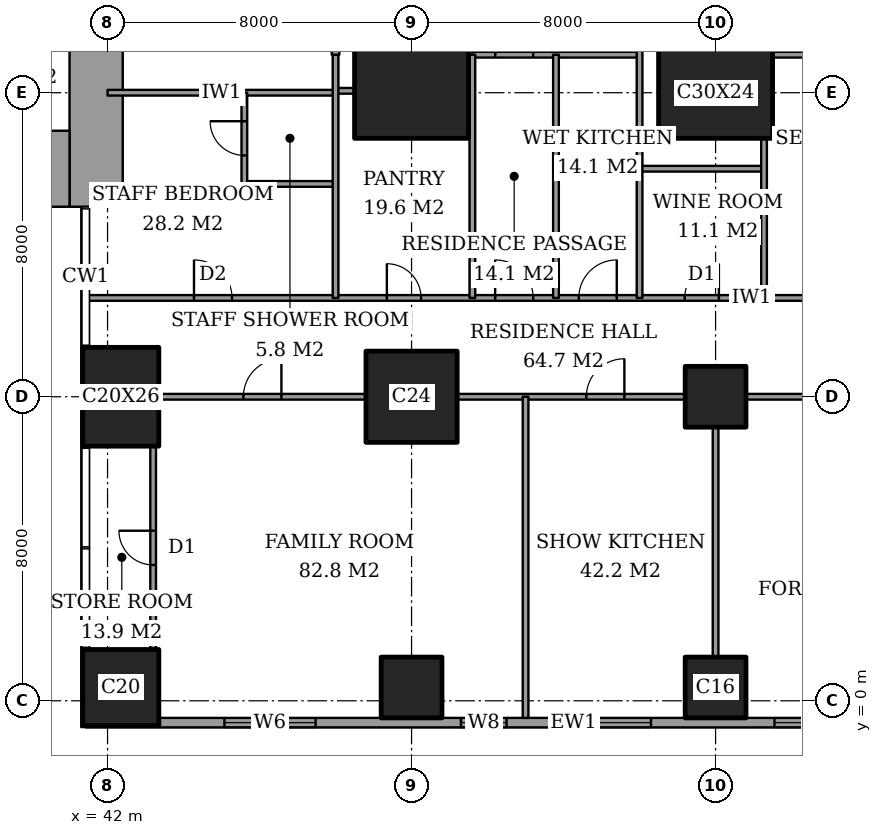
"""IFC4 building model, lengths in metres.
Left out: names, types, materials, properties, quantities, classifications, styles, units other than length and angle.
Written with IfcOpenShell. Run it as: python <this file> out.ifc"""

import sys

from ifc_helpers import new_model, si_unit, direction, frame, frame_2d, origin, origin_2d, place, context, subcontext, project, spatial, rectangle, extrude, element, fill, save


model = new_model("IFC4")
c1 = context("Model", 3, precision=1e-05, world=origin(), true_north=direction((0.0, 1.0)))
c2 = subcontext(c1, "Body", "Model", "MODEL_VIEW")
j1 = project(units=[si_unit("LENGTHUNIT", "METRE"), si_unit("PLANEANGLEUNIT", "RADIAN")], contexts=[c1])
p1 = place(None, origin())
s1 = spatial("IfcSite", under=j1, at=p1, CompositionType="ELEMENT")
p2 = place(p1, origin())
s2 = spatial("IfcBuilding", under=s1, at=p2, CompositionType="ELEMENT")
p3 = place(p2, frame((0.0, 0.0, 273.6)))
s3 = spatial("IfcBuildingStorey", under=s2, at=p3, CompositionType="ELEMENT", Elevation=273.6)
p4 = place(p3, frame((42.35, 0.35, 0.0), z_axis=(0.0, 0.0, 1.0), x_axis=(1.0, 0.0, 0.0)))
e1 = element("IfcColumn", 1, at=p4, inside=s3, PredefinedType="COLUMN", context=c2, shape_type="SweptSolid", body=[
    extrude(rectangle(XDim=2.0, YDim=2.0, at=origin_2d()), origin(), (0.0, 0.0, 1.0), 3.6),
])
p5 = place(p3, frame((42.35, 8.0, 0.0), z_axis=(0.0, 0.0, 1.0), x_axis=(1.0, 0.0, 0.0)))
e2 = element("IfcColumn", 2, at=p5, inside=s3, PredefinedType="COLUMN", context=c2, shape_type="SweptSolid", body=[
    extrude(rectangle(XDim=2.0, YDim=2.6, at=origin_2d()), origin(), (0.0, 0.0, 1.0), 3.6),
])
p6 = place(p3, frame((50.0, 0.35, 0.0), z_axis=(0.0, 0.0, 1.0), x_axis=(1.0, 0.0, 0.0)))
e3 = element("IfcColumn", 3, at=p6, inside=s3, PredefinedType="COLUMN", context=c2, shape_type="SweptSolid", body=[
    extrude(rectangle(XDim=1.6, YDim=1.6, at=origin_2d()), origin(), (0.0, 0.0, 1.0), 3.6),
])
p7 = place(p3, frame((50.0, 8.0, 0.0), z_axis=(0.0, 0.0, 1.0), x_axis=(1.0, 0.0, 0.0)))
e4 = element("IfcColumn", 4, at=p7, inside=s3, PredefinedType="COLUMN", context=c2, shape_type="SweptSolid", body=[
    extrude(rectangle(XDim=2.4, YDim=2.4, at=origin_2d()), origin(), (0.0, 0.0, 1.0), 3.6),
])
p8 = place(p3, frame((50.0, 16.0, 0.0), z_axis=(0.0, 0.0, 1.0), x_axis=(1.0, 0.0, 0.0)))
e5 = element("IfcColumn", 5, at=p8, inside=s3, PredefinedType="COLUMN", context=c2, shape_type="SweptSolid", body=[
    extrude(rectangle(XDim=3.0, YDim=2.4, at=origin_2d()), origin(), (0.0, 0.0, 1.0), 3.6),
])
for number, where, z_axis, x_axis in (
    (6, (58.0, 0.35, 0.0), (0.0, 0.0, 1.0), (1.0, 0.0, 0.0)),
    (7, (58.0, 8.0, 0.0), (0.0, 0.0, 1.0), (1.0, 0.0, 0.0)),
):
    element("IfcColumn", number, at=place(p3, frame(where, z_axis=z_axis, x_axis=x_axis)), inside=s3, PredefinedType="COLUMN", context=c2, shape_type="SweptSolid", body=[
        extrude(rectangle(XDim=1.6, YDim=1.6, at=origin_2d()), origin(), (0.0, 0.0, 1.0), 3.6),
    ])
p9 = place(p3, frame((58.0, 16.0, 0.0), z_axis=(0.0, 0.0, 1.0), x_axis=(1.0, 0.0, 0.0)))
e8 = element("IfcColumn", 8, at=p9, inside=s3, PredefinedType="COLUMN", context=c2, shape_type="SweptSolid", body=[
    extrude(rectangle(XDim=3.0, YDim=2.4, at=origin_2d()), origin(), (0.0, 0.0, 1.0), 3.6),
])
p10 = place(p3, frame((37.85, 14.0, 0.0), z_axis=(0.0, 0.0, 1.0), x_axis=(1.0, 0.0, 0.0)))
e9 = element("IfcWall", 9, at=p10, inside=s3, PredefinedType="SHEAR", context=c2, shape_type="SweptSolid", body=[
    extrude(rectangle(XDim=3.15, YDim=2.0, at=frame_2d((1.575, 0.0))), origin(), (0.0, 0.0, 1.0), 3.6),
])
p11 = place(p3, frame((41.7, 13.0, 0.0), z_axis=(0.0, 0.0, 1.0), x_axis=(0.0, 1.0, 0.0)))
e10 = element("IfcWall", 10, at=p11, inside=s3, PredefinedType="SHEAR", context=c2, shape_type="SweptSolid", body=[
    extrude(rectangle(XDim=11.85, YDim=1.4, at=frame_2d((5.925, 0.0))), origin(), (0.0, 0.0, 1.0), 3.6),
])
p12 = place(p11, frame((7.5, 0.0, 0.0)))
e11 = element("IfcOpeningElement", 11, at=p12, cuts=e10, PredefinedType="OPENING", context=c2, shape_type="SweptSolid", body=[
    extrude(rectangle(XDim=1.8, YDim=2.4, at=frame_2d((0.9, 1.2))), frame((0.0, 0.71, 0.0), z_axis=(0.0, -1.0, 0.0), x_axis=(1.0, 0.0, 0.0)), (0.0, 0.0, 1.0), 1.42),
])
p13 = place(p3, frame((41.425, -0.575, 0.0), z_axis=(0.0, 0.0, 1.0), x_axis=(1.0, 0.0, 0.0)))
e12 = element("IfcWall", 12, at=p13, inside=s3, PredefinedType="SOLIDWALL", context=c2, shape_type="SweptSolid", body=[
    extrude(rectangle(XDim=21.4, YDim=0.25, at=frame_2d((10.7, 0.0))), origin(), (0.0, 0.0, 1.0), 3.6),
])
p14 = place(p13, frame((3.65, 0.0, 0.6)))
e13 = element("IfcOpeningElement", 13, at=p14, cuts=e12, PredefinedType="OPENING", context=c2, shape_type="SweptSolid", body=[
    extrude(rectangle(XDim=2.4, YDim=2.0, at=frame_2d((1.2, 1.0))), frame((0.0, 0.135, 0.0), z_axis=(0.0, -1.0, 0.0), x_axis=(1.0, 0.0, 0.0)), (0.0, 0.0, 1.0), 0.27),
])
p15 = place(p13, frame((9.875, 0.0, 0.6)))
e14 = element("IfcOpeningElement", 14, at=p15, cuts=e12, PredefinedType="OPENING", context=c2, shape_type="SweptSolid", body=[
    extrude(rectangle(XDim=1.2, YDim=2.0, at=frame_2d((0.6, 1.0))), frame((0.0, 0.135, 0.0), z_axis=(0.0, -1.0, 0.0), x_axis=(1.0, 0.0, 0.0)), (0.0, 0.0, 1.0), 0.27),
])
p16 = place(p13, frame((12.475, 0.0, 0.6)))
e15 = element("IfcOpeningElement", 15, at=p16, cuts=e12, PredefinedType="OPENING", context=c2, shape_type="SweptSolid", body=[
    extrude(rectangle(XDim=2.4, YDim=2.0, at=frame_2d((1.2, 1.0))), frame((0.0, 0.135, 0.0), z_axis=(0.0, -1.0, 0.0), x_axis=(1.0, 0.0, 0.0)), (0.0, 0.0, 1.0), 0.27),
])
p17 = place(p13, frame((18.125, 0.0, 0.6)))
e16 = element("IfcOpeningElement", 16, at=p17, cuts=e12, PredefinedType="OPENING", context=c2, shape_type="SweptSolid", body=[
    extrude(rectangle(XDim=2.4, YDim=2.0, at=frame_2d((1.2, 1.0))), frame((0.0, 0.135, 0.0), z_axis=(0.0, -1.0, 0.0), x_axis=(1.0, 0.0, 0.0)), (0.0, 0.0, 1.0), 0.27),
])
p18 = place(p3, frame((43.35, 8.0, 0.0), z_axis=(0.0, 0.0, 1.0), x_axis=(1.0, 0.0, 0.0)))
e17 = element("IfcWall", 17, at=p18, inside=s3, PredefinedType="PARTITIONING", context=c2, shape_type="SweptSolid", body=[
    extrude(rectangle(XDim=5.45, YDim=0.15, at=frame_2d((2.725, 0.0))), origin(), (0.0, 0.0, 1.0), 3.25),
])
p19 = place(p18, frame((2.225, 0.0, 0.0)))
e18 = element("IfcOpeningElement", 18, at=p19, cuts=e17, PredefinedType="OPENING", context=c2, shape_type="SweptSolid", body=[
    extrude(rectangle(XDim=1.0, YDim=2.1, at=frame_2d((0.5, 1.05))), frame((0.0, 0.085, 0.0), z_axis=(0.0, -1.0, 0.0), x_axis=(1.0, 0.0, 0.0)), (0.0, 0.0, 1.0), 0.17),
])
p20 = place(p3, frame((51.2, 8.0, 0.0), z_axis=(0.0, 0.0, 1.0), x_axis=(1.0, 0.0, 0.0)))
e19 = element("IfcWall", 19, at=p20, inside=s3, PredefinedType="PARTITIONING", context=c2, shape_type="SweptSolid", body=[
    extrude(rectangle(XDim=6.0, YDim=0.15, at=frame_2d((3.0, 0.0))), origin(), (0.0, 0.0, 1.0), 3.25),
])
p21 = place(p20, frame((3.4, 0.0, 0.0)))
e20 = element("IfcOpeningElement", 20, at=p21, cuts=e19, PredefinedType="OPENING", context=c2, shape_type="SweptSolid", body=[
    extrude(rectangle(XDim=1.0, YDim=2.1, at=frame_2d((0.5, 1.05))), frame((0.0, 0.085, 0.0), z_axis=(0.0, -1.0, 0.0), x_axis=(1.0, 0.0, 0.0)), (0.0, 0.0, 1.0), 0.17),
])
p22 = place(p3, frame((58.8, 8.0, 0.0), z_axis=(0.0, 0.0, 1.0), x_axis=(1.0, 0.0, 0.0)))
e21 = element("IfcWall", 21, at=p22, inside=s3, PredefinedType="PARTITIONING", context=c2, shape_type="SweptSolid", body=[
    extrude(rectangle(XDim=6.05, YDim=0.15, at=frame_2d((3.025, 0.0))), origin(), (0.0, 0.0, 1.0), 3.25),
])
p23 = place(p22, frame((2.525, 0.0, 0.0)))
e22 = element("IfcOpeningElement", 22, at=p23, cuts=e21, PredefinedType="OPENING", context=c2, shape_type="SweptSolid", body=[
    extrude(rectangle(XDim=1.0, YDim=2.1, at=frame_2d((0.5, 1.05))), frame((0.0, 0.085, 0.0), z_axis=(0.0, -1.0, 0.0), x_axis=(1.0, 0.0, 0.0)), (0.0, 0.0, 1.0), 0.17),
])
p24 = place(p3, frame((41.439, 10.6, 0.0), z_axis=(0.0, 0.0, 1.0), x_axis=(1.0, 0.0, 0.0)))
e23 = element("IfcWall", 23, at=p24, inside=s3, PredefinedType="PARTITIONING", context=c2, shape_type="SweptSolid", body=[
    extrude(rectangle(XDim=25.011, YDim=0.15, at=frame_2d((12.505, 0.0))), origin(), (0.0, 0.0, 1.0), 3.25),
])
p25 = place(p24, frame((10.761, 0.0, 0.0)))
e24 = element("IfcOpeningElement", 24, at=p25, cuts=e23, PredefinedType="OPENING", context=c2, shape_type="SweptSolid", body=[
    extrude(rectangle(XDim=1.0, YDim=2.1, at=frame_2d((0.5, 1.05))), frame((0.0, 0.085, 0.0), z_axis=(0.0, -1.0, 0.0), x_axis=(1.0, 0.0, 0.0)), (0.0, 0.0, 1.0), 0.17),
])
p26 = place(p24, frame((20.924, 0.0, 0.0)))
e25 = element("IfcOpeningElement", 25, at=p26, cuts=e23, PredefinedType="OPENING", context=c2, shape_type="SweptSolid", body=[
    extrude(rectangle(XDim=1.0, YDim=2.1, at=frame_2d((0.5, 1.05))), frame((0.0, 0.085, 0.0), z_axis=(0.0, -1.0, 0.0), x_axis=(1.0, 0.0, 0.0)), (0.0, 0.0, 1.0), 0.17),
])
p27 = place(p24, frame((15.749, 0.0, 0.0)))
e26 = element("IfcOpeningElement", 26, at=p27, cuts=e23, PredefinedType="OPENING", context=c2, shape_type="SweptSolid", body=[
    extrude(rectangle(XDim=0.9, YDim=2.1, at=frame_2d((0.45, 1.05))), frame((0.0, 0.085, 0.0), z_axis=(0.0, -1.0, 0.0), x_axis=(1.0, 0.0, 0.0)), (0.0, 0.0, 1.0), 0.17),
])
p28 = place(p24, frame((12.961, 0.0, 0.0)))
e27 = element("IfcOpeningElement", 27, at=p28, cuts=e23, PredefinedType="OPENING", context=c2, shape_type="SweptSolid", body=[
    extrude(rectangle(XDim=1.0, YDim=2.1, at=frame_2d((0.5, 1.05))), frame((0.0, 0.085, 0.0), z_axis=(0.0, -1.0, 0.0), x_axis=(1.0, 0.0, 0.0)), (0.0, 0.0, 1.0), 0.17),
])
p29 = place(p24, frame((7.911, 0.0, 0.0)))
e28 = element("IfcOpeningElement", 28, at=p29, cuts=e23, PredefinedType="OPENING", context=c2, shape_type="SweptSolid", body=[
    extrude(rectangle(XDim=0.9, YDim=2.1, at=frame_2d((0.45, 1.05))), frame((0.0, 0.085, 0.0), z_axis=(0.0, -1.0, 0.0), x_axis=(1.0, 0.0, 0.0)), (0.0, 0.0, 1.0), 0.17),
])
p30 = place(p24, frame((2.836, 0.0, 0.0)))
e29 = element("IfcOpeningElement", 29, at=p30, cuts=e23, PredefinedType="OPENING", context=c2, shape_type="SweptSolid", body=[
    extrude(rectangle(XDim=1.0, YDim=2.1, at=frame_2d((0.5, 1.05))), frame((0.0, 0.085, 0.0), z_axis=(0.0, -1.0, 0.0), x_axis=(1.0, 0.0, 0.0)), (0.0, 0.0, 1.0), 0.17),
])
p31 = place(p3, frame((45.6, 13.6, 0.0), z_axis=(0.0, 0.0, 1.0), x_axis=(1.0, 0.0, 0.0)))
e30 = element("IfcWall", 30, at=p31, inside=s3, PredefinedType="PARTITIONING", context=c2, shape_type="SweptSolid", body=[
    extrude(rectangle(XDim=2.4, YDim=0.15, at=frame_2d((1.2, 0.0))), origin(), (0.0, 0.0, 1.0), 3.25),
])
p32 = place(p3, frame((56.0, 14.0, 0.0), z_axis=(0.0, 0.0, 1.0), x_axis=(1.0, 0.0, 0.0)))
e31 = element("IfcWall", 31, at=p32, inside=s3, PredefinedType="PARTITIONING", context=c2, shape_type="SweptSolid", body=[
    extrude(rectangle(XDim=3.275, YDim=0.15, at=frame_2d((1.637, 0.0))), origin(), (0.0, 0.0, 1.0), 3.25),
])
p33 = place(p3, frame((42.0, 16.0, 0.0), z_axis=(0.0, 0.0, 1.0), x_axis=(1.0, 0.0, 0.0)))
e32 = element("IfcWall", 32, at=p33, inside=s3, PredefinedType="PARTITIONING", context=c2, shape_type="SweptSolid", body=[
    extrude(rectangle(XDim=6.0, YDim=0.15, at=frame_2d((3.0, 0.0))), origin(), (0.0, 0.0, 1.0), 3.25),
])
p34 = place(p3, frame((48.0, 16.05, 0.0), z_axis=(0.0, 0.0, 1.0), x_axis=(1.0, 0.0, 0.0)))
e33 = element("IfcWall", 33, at=p34, inside=s3, PredefinedType="PARTITIONING", context=c2, shape_type="SweptSolid", body=[
    extrude(rectangle(XDim=0.5, YDim=0.15, at=frame_2d((0.25, 0.0))), origin(), (0.0, 0.0, 1.0), 3.25),
])
p35 = place(p3, frame((51.6, 17.0, 0.0), z_axis=(0.0, 0.0, 1.0), x_axis=(1.0, 0.0, 0.0)))
e34 = element("IfcWall", 34, at=p35, inside=s3, PredefinedType="PARTITIONING", context=c2, shape_type="SweptSolid", body=[
    extrude(rectangle(XDim=4.4, YDim=0.15, at=frame_2d((2.2, 0.0))), origin(), (0.0, 0.0, 1.0), 3.25),
])
p36 = place(p35, frame((0.6, 0.0, 0.0)))
e35 = element("IfcOpeningElement", 35, at=p36, cuts=e34, PredefinedType="OPENING", context=c2, shape_type="SweptSolid", body=[
    extrude(rectangle(XDim=1.0, YDim=2.1, at=frame_2d((0.5, 1.05))), frame((0.0, 0.085, 0.0), z_axis=(0.0, -1.0, 0.0), x_axis=(1.0, 0.0, 0.0)), (0.0, 0.0, 1.0), 0.17),
])
p37 = place(p3, frame((59.5, 17.0, 0.0), z_axis=(0.0, 0.0, 1.0), x_axis=(1.0, 0.0, 0.0)))
e36 = element("IfcWall", 36, at=p37, inside=s3, PredefinedType="PARTITIONING", context=c2, shape_type="SweptSolid", body=[
    extrude(rectangle(XDim=6.95, YDim=0.15, at=frame_2d((3.475, 0.0))), origin(), (0.0, 0.0, 1.0), 3.25),
])
p38 = place(p3, frame((43.2, 1.35, 0.0), z_axis=(0.0, 0.0, 1.0), x_axis=(0.0, 1.0, 0.0)))
e37 = element("IfcWall", 37, at=p38, inside=s3, PredefinedType="PARTITIONING", context=c2, shape_type="SweptSolid", body=[
    extrude(rectangle(XDim=5.35, YDim=0.15, at=frame_2d((2.675, 0.0))), origin(), (0.0, 0.0, 1.0), 3.25),
])
p39 = place(p38, frame((2.225, 0.0, 0.0)))
e38 = element("IfcOpeningElement", 38, at=p39, cuts=e37, PredefinedType="OPENING", context=c2, shape_type="SweptSolid", body=[
    extrude(rectangle(XDim=0.9, YDim=2.1, at=frame_2d((0.45, 1.05))), frame((0.0, 0.085, 0.0), z_axis=(0.0, -1.0, 0.0), x_axis=(1.0, 0.0, 0.0)), (0.0, 0.0, 1.0), 0.17),
])
p40 = place(p3, frame((45.6, 13.6, 0.0), z_axis=(0.0, 0.0, 1.0), x_axis=(0.0, 1.0, 0.0)))
e39 = element("IfcWall", 39, at=p40, inside=s3, PredefinedType="PARTITIONING", context=c2, shape_type="SweptSolid", body=[
    extrude(rectangle(XDim=2.4, YDim=0.15, at=frame_2d((1.2, 0.0))), origin(), (0.0, 0.0, 1.0), 3.25),
])
p41 = place(p40, frame((0.75, 0.0, 0.0)))
e40 = element("IfcOpeningElement", 40, at=p41, cuts=e39, PredefinedType="OPENING", context=c2, shape_type="SweptSolid", body=[
    extrude(rectangle(XDim=0.9, YDim=2.1, at=frame_2d((0.45, 1.05))), frame((0.0, 0.085, 0.0), z_axis=(0.0, -1.0, 0.0), x_axis=(1.0, 0.0, 0.0)), (0.0, 0.0, 1.0), 0.17),
])
p42 = place(p3, frame((48.0, 17.0, 0.0), z_axis=(0.0, 0.0, 1.0), x_axis=(0.0, 1.0, 0.0)))
e41 = element("IfcWall", 41, at=p42, inside=s3, PredefinedType="PARTITIONING", context=c2, shape_type="SweptSolid", body=[
    extrude(rectangle(XDim=7.0, YDim=0.2, at=frame_2d((3.5, 0.0))), origin(), (0.0, 0.0, 1.0), 3.25),
])
p43 = place(p42, frame((4.4, 0.0, 0.0)))
e42 = element("IfcOpeningElement", 42, at=p43, cuts=e41, PredefinedType="OPENING", context=c2, shape_type="SweptSolid", body=[
    extrude(rectangle(XDim=1.2, YDim=2.4, at=frame_2d((0.6, 1.2))), frame((0.0, 0.11, 0.0), z_axis=(0.0, -1.0, 0.0), x_axis=(1.0, 0.0, 0.0)), (0.0, 0.0, 1.0), 0.22),
])
p44 = place(p42, frame((1.05, 0.0, 0.0)))
e43 = element("IfcOpeningElement", 43, at=p44, cuts=e41, PredefinedType="OPENING", context=c2, shape_type="SweptSolid", body=[
    extrude(rectangle(XDim=0.9, YDim=2.1, at=frame_2d((0.45, 1.05))), frame((0.0, 0.11, 0.0), z_axis=(0.0, -1.0, 0.0), x_axis=(1.0, 0.0, 0.0)), (0.0, 0.0, 1.0), 0.22),
])
for number, where, z_axis, x_axis in (
    (44, (48.0, 10.6, 0.0), (0.0, 0.0, 1.0), (0.0, 1.0, 0.0)),
    (45, (51.6, 10.6, 0.0), (0.0, 0.0, 1.0), (0.0, 1.0, 0.0)),
):
    element("IfcWall", number, at=place(p3, frame(where, z_axis=z_axis, x_axis=x_axis)), inside=s3, PredefinedType="PARTITIONING", context=c2, shape_type="SweptSolid", body=[
        extrude(rectangle(XDim=6.4, YDim=0.15, at=frame_2d((3.2, 0.0))), origin(), (0.0, 0.0, 1.0), 3.25),
    ])
p45 = place(p3, frame((53.0, -0.45, 0.0), z_axis=(0.0, 0.0, 1.0), x_axis=(0.0, 1.0, 0.0)))
e46 = element("IfcWall", 46, at=p45, inside=s3, PredefinedType="PARTITIONING", context=c2, shape_type="SweptSolid", body=[
    extrude(rectangle(XDim=8.45, YDim=0.15, at=frame_2d((4.225, 0.0))), origin(), (0.0, 0.0, 1.0), 3.25),
])
p46 = place(p3, frame((53.8, 10.6, 0.0), z_axis=(0.0, 0.0, 1.0), x_axis=(0.0, 1.0, 0.0)))
e47 = element("IfcWall", 47, at=p46, inside=s3, PredefinedType="PARTITIONING", context=c2, shape_type="SweptSolid", body=[
    extrude(rectangle(XDim=6.4, YDim=0.15, at=frame_2d((3.2, 0.0))), origin(), (0.0, 0.0, 1.0), 3.25),
])
p47 = place(p3, frame((56.0, 10.6, 0.0), z_axis=(0.0, 0.0, 1.0), x_axis=(0.0, 1.0, 0.0)))
e48 = element("IfcWall", 48, at=p47, inside=s3, PredefinedType="PARTITIONING", context=c2, shape_type="SweptSolid", body=[
    extrude(rectangle(XDim=11.0, YDim=0.15, at=frame_2d((5.5, 0.0))), origin(), (0.0, 0.0, 1.0), 3.25),
])
p48 = place(p47, frame((8.2, 0.0, 0.0)))
e49 = element("IfcOpeningElement", 49, at=p48, cuts=e48, PredefinedType="OPENING", context=c2, shape_type="SweptSolid", body=[
    extrude(rectangle(XDim=1.0, YDim=2.1, at=frame_2d((0.5, 1.05))), frame((0.0, 0.085, 0.0), z_axis=(0.0, -1.0, 0.0), x_axis=(1.0, 0.0, 0.0)), (0.0, 0.0, 1.0), 0.17),
])
p49 = place(p3, frame((58.0, 1.15, 0.0), z_axis=(0.0, 0.0, 1.0), x_axis=(0.0, 1.0, 0.0)))
e50 = element("IfcWall", 50, at=p49, inside=s3, PredefinedType="PARTITIONING", context=c2, shape_type="SweptSolid", body=[
    extrude(rectangle(XDim=6.05, YDim=0.15, at=frame_2d((3.025, 0.0))), origin(), (0.0, 0.0, 1.0), 3.25),
])
p50 = place(p3, frame((59.275, 10.6, 0.0), z_axis=(0.0, 0.0, 1.0), x_axis=(0.0, 1.0, 0.0)))
e51 = element("IfcWall", 51, at=p50, inside=s3, PredefinedType="PARTITIONING", context=c2, shape_type="SweptSolid", body=[
    extrude(rectangle(XDim=4.2, YDim=0.15, at=frame_2d((2.1, 0.0))), origin(), (0.0, 0.0, 1.0), 3.25),
])
p51 = place(p14, origin())
e52 = element("IfcWindow", 52, at=p51, inside=s3, PartitioningType="SINGLE_PANEL", PredefinedType="WINDOW", context=c2, shape_type="SweptSolid", body=[
    extrude(rectangle(XDim=2.4, YDim=2.0, at=frame_2d((1.2, 1.0))), frame((0.0, 0.03, 0.0), z_axis=(0.0, -1.0, 0.0), x_axis=(1.0, 0.0, 0.0)), (0.0, 0.0, 1.0), 0.06),
])
fill(e13, e52)
p52 = place(p15, origin())
e53 = element("IfcWindow", 53, at=p52, inside=s3, PartitioningType="SINGLE_PANEL", PredefinedType="WINDOW", context=c2, shape_type="SweptSolid", body=[
    extrude(rectangle(XDim=1.2, YDim=2.0, at=frame_2d((0.6, 1.0))), frame((0.0, 0.03, 0.0), z_axis=(0.0, -1.0, 0.0), x_axis=(1.0, 0.0, 0.0)), (0.0, 0.0, 1.0), 0.06),
])
fill(e14, e53)
p53 = place(p16, origin())
e54 = element("IfcWindow", 54, at=p53, inside=s3, PartitioningType="SINGLE_PANEL", PredefinedType="WINDOW", context=c2, shape_type="SweptSolid", body=[
    extrude(rectangle(XDim=2.4, YDim=2.0, at=frame_2d((1.2, 1.0))), frame((0.0, 0.03, 0.0), z_axis=(0.0, -1.0, 0.0), x_axis=(1.0, 0.0, 0.0)), (0.0, 0.0, 1.0), 0.06),
])
fill(e15, e54)
p54 = place(p17, origin())
e55 = element("IfcWindow", 55, at=p54, inside=s3, PartitioningType="SINGLE_PANEL", PredefinedType="WINDOW", context=c2, shape_type="SweptSolid", body=[
    extrude(rectangle(XDim=2.4, YDim=2.0, at=frame_2d((1.2, 1.0))), frame((0.0, 0.03, 0.0), z_axis=(0.0, -1.0, 0.0), x_axis=(1.0, 0.0, 0.0)), (0.0, 0.0, 1.0), 0.06),
])
fill(e16, e55)
p55 = place(p21, origin())
e56 = element("IfcDoor", 56, at=p55, inside=s3, OperationType="SINGLE_SWING_LEFT", PredefinedType="DOOR", context=c2, shape_type="SweptSolid", body=[
    extrude(rectangle(XDim=1.0, YDim=2.1, at=frame_2d((0.5, 1.05))), frame((0.0, 0.025, 0.0), z_axis=(0.0, -1.0, 0.0), x_axis=(1.0, 0.0, 0.0)), (0.0, 0.0, 1.0), 0.05),
])
fill(e20, e56)
p56 = place(p19, origin())
e57 = element("IfcDoor", 57, at=p56, inside=s3, OperationType="SINGLE_SWING_LEFT", PredefinedType="DOOR", context=c2, shape_type="SweptSolid", body=[
    extrude(rectangle(XDim=1.0, YDim=2.1, at=frame_2d((0.5, 1.05))), frame((0.0, 0.025, 0.0), z_axis=(0.0, -1.0, 0.0), x_axis=(1.0, 0.0, 0.0)), (0.0, 0.0, 1.0), 0.05),
])
fill(e18, e57)
p57 = place(p39, origin())
e58 = element("IfcDoor", 58, at=p57, inside=s3, OperationType="SINGLE_SWING_LEFT", PredefinedType="DOOR", context=c2, shape_type="SweptSolid", body=[
    extrude(rectangle(XDim=0.9, YDim=2.1, at=frame_2d((0.45, 1.05))), frame((0.0, 0.025, 0.0), z_axis=(0.0, -1.0, 0.0), x_axis=(1.0, 0.0, 0.0)), (0.0, 0.0, 1.0), 0.05),
])
fill(e38, e58)
p58 = place(p25, origin())
e59 = element("IfcDoor", 59, at=p58, inside=s3, OperationType="SINGLE_SWING_RIGHT", PredefinedType="DOOR", context=c2, shape_type="SweptSolid", body=[
    extrude(rectangle(XDim=1.0, YDim=2.1, at=frame_2d((0.5, 1.05))), frame((0.0, 0.025, 0.0), z_axis=(0.0, -1.0, 0.0), x_axis=(1.0, 0.0, 0.0)), (0.0, 0.0, 1.0), 0.05),
])
fill(e24, e59)
p59 = place(p27, origin())
e60 = element("IfcDoor", 60, at=p59, inside=s3, OperationType="SINGLE_SWING_LEFT", PredefinedType="DOOR", context=c2, shape_type="SweptSolid", body=[
    extrude(rectangle(XDim=0.9, YDim=2.1, at=frame_2d((0.45, 1.05))), frame((0.0, 0.025, 0.0), z_axis=(0.0, -1.0, 0.0), x_axis=(1.0, 0.0, 0.0)), (0.0, 0.0, 1.0), 0.05),
])
fill(e26, e60)
p60 = place(p28, origin())
e61 = element("IfcDoor", 61, at=p60, inside=s3, OperationType="SINGLE_SWING_LEFT", PredefinedType="DOOR", context=c2, shape_type="SweptSolid", body=[
    extrude(rectangle(XDim=1.0, YDim=2.1, at=frame_2d((0.5, 1.05))), frame((0.0, 0.025, 0.0), z_axis=(0.0, -1.0, 0.0), x_axis=(1.0, 0.0, 0.0)), (0.0, 0.0, 1.0), 0.05),
])
fill(e27, e61)
p61 = place(p36, origin())
e62 = element("IfcDoor", 62, at=p61, inside=s3, OperationType="SINGLE_SWING_RIGHT", PredefinedType="DOOR", context=c2, shape_type="SweptSolid", body=[
    extrude(rectangle(XDim=1.0, YDim=2.1, at=frame_2d((0.5, 1.05))), frame((0.0, 0.025, 0.0), z_axis=(0.0, -1.0, 0.0), x_axis=(1.0, 0.0, 0.0)), (0.0, 0.0, 1.0), 0.05),
])
fill(e35, e62)
p62 = place(p29, origin())
e63 = element("IfcDoor", 63, at=p62, inside=s3, OperationType="SINGLE_SWING_RIGHT", PredefinedType="DOOR", context=c2, shape_type="SweptSolid", body=[
    extrude(rectangle(XDim=0.9, YDim=2.1, at=frame_2d((0.45, 1.05))), frame((0.0, 0.025, 0.0), z_axis=(0.0, -1.0, 0.0), x_axis=(1.0, 0.0, 0.0)), (0.0, 0.0, 1.0), 0.05),
])
fill(e28, e63)
p63 = place(p41, origin())
e64 = element("IfcDoor", 64, at=p63, inside=s3, OperationType="SINGLE_SWING_LEFT", PredefinedType="DOOR", context=c2, shape_type="SweptSolid", body=[
    extrude(rectangle(XDim=0.9, YDim=2.1, at=frame_2d((0.45, 1.05))), frame((0.0, 0.025, 0.0), z_axis=(0.0, -1.0, 0.0), x_axis=(1.0, 0.0, 0.0)), (0.0, 0.0, 1.0), 0.05),
])
fill(e40, e64)
p64 = place(p30, origin())
e65 = element("IfcDoor", 65, at=p64, inside=s3, OperationType="SINGLE_SWING_RIGHT", PredefinedType="DOOR", context=c2, shape_type="SweptSolid", body=[
    extrude(rectangle(XDim=1.0, YDim=2.1, at=frame_2d((0.5, 1.05))), frame((0.0, 0.025, 0.0), z_axis=(0.0, -1.0, 0.0), x_axis=(1.0, 0.0, 0.0)), (0.0, 0.0, 1.0), 0.05),
])
fill(e29, e65)
save(model, sys.argv[1])
